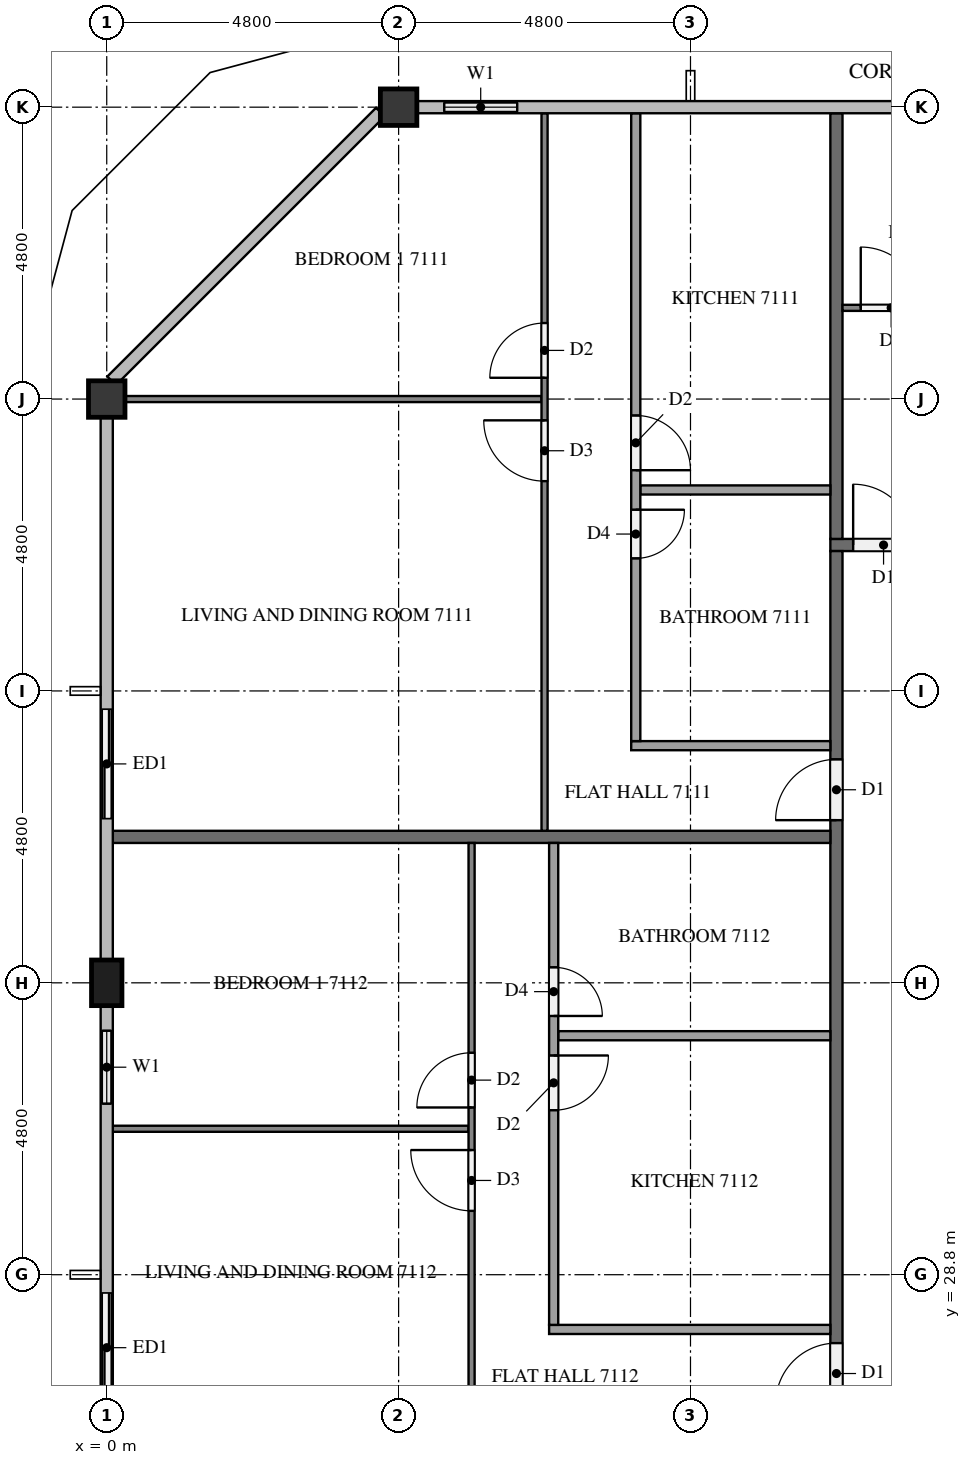
"""IFC4 building model, lengths in metres.
Left out: names, types, materials, properties, quantities, classifications, styles, units other than length and angle.
Written with IfcOpenShell. Run it as: python <this file> out.ifc"""

import sys

from ifc_helpers import new_model, si_unit, direction, frame, frame_2d, origin, origin_2d, place, context, subcontext, project, spatial, rectangle, extrude, element, fill, save


model = new_model("IFC4")
c1 = context("Model", 3, precision=1e-05, world=origin(), true_north=direction((0.0, 1.0)))
c2 = subcontext(c1, "Body", "Model", "MODEL_VIEW")
j1 = project(units=[si_unit("LENGTHUNIT", "METRE"), si_unit("PLANEANGLEUNIT", "RADIAN")], contexts=[c1])
p1 = place(None, origin())
s1 = spatial("IfcSite", under=j1, at=p1, CompositionType="ELEMENT")
p2 = place(p1, origin())
s2 = spatial("IfcBuilding", under=s1, at=p2, CompositionType="ELEMENT")
p3 = place(p2, frame((0.0, 0.0, 272.1)))
s3 = spatial("IfcBuildingStorey", under=s2, at=p3, CompositionType="ELEMENT", Elevation=272.1)
for number, where, z_axis, x_axis in (
    (1, (4.8, 48.0, 0.0), (0.0, 0.0, 1.0), (1.0, 0.0, 0.0)),
    (2, (0.0, 43.2, 0.0), (0.0, 0.0, 1.0), (1.0, 0.0, 0.0)),
):
    element("IfcColumn", number, at=place(p3, frame(where, z_axis=z_axis, x_axis=x_axis)), inside=s3, PredefinedType="COLUMN", context=c2, shape_type="SweptSolid", body=[
        extrude(rectangle(XDim=0.6, YDim=0.6, at=origin_2d()), origin(), (0.0, 0.0, 1.0), 3.2),
    ])
p4 = place(p3, frame((0.0, 33.6, 0.0), z_axis=(0.0, 0.0, 1.0), x_axis=(0.0, 1.0, 0.0)))
e3 = element("IfcColumn", 3, at=p4, inside=s3, PredefinedType="COLUMN", context=c2, shape_type="SweptSolid", body=[
    extrude(rectangle(XDim=0.75, YDim=0.5, at=origin_2d()), origin(), (0.0, 0.0, 1.0), 3.2),
])
p5 = place(p3, frame((7.2, 48.0, 0.0), z_axis=(0.0, 0.0, 1.0), x_axis=(-1.0, 0.0, 0.0)))
e4 = element("IfcWall", 4, at=p5, inside=s3, PredefinedType="SOLIDWALL", context=c2, shape_type="SweptSolid", body=[
    extrude(rectangle(XDim=2.1, YDim=0.15, at=frame_2d((1.05, 0.0))), origin(), (0.0, 0.0, 1.0), 3.2),
])
p6 = place(p5, frame((0.45, 0.0, 0.9)))
e5 = element("IfcOpeningElement", 5, at=p6, cuts=e4, PredefinedType="OPENING", context=c2, shape_type="SweptSolid", body=[
    extrude(rectangle(XDim=1.2, YDim=1.4, at=frame_2d((0.6, 0.7))), frame((0.0, 0.085, 0.0), z_axis=(0.0, -1.0, 0.0), x_axis=(1.0, 0.0, 0.0)), (0.0, 0.0, 1.0), 0.17),
])
p7 = place(p3, frame((0.0, 38.4, 0.0), z_axis=(0.0, 0.0, 1.0), x_axis=(0.0, -1.0, 0.0)))
e6 = element("IfcWall", 6, at=p7, inside=s3, PredefinedType="SOLIDWALL", context=c2, shape_type="SweptSolid", body=[
    extrude(rectangle(XDim=2.4, YDim=0.15, at=frame_2d((1.2, 0.0))), origin(), (0.0, 0.0, 1.0), 3.2),
])
p8 = place(p7, frame((0.3, 0.0, 0.0)))
e7 = element("IfcOpeningElement", 7, at=p8, cuts=e6, PredefinedType="OPENING", context=c2, shape_type="SweptSolid", body=[
    extrude(rectangle(XDim=1.8, YDim=2.4, at=frame_2d((0.9, 1.2))), frame((0.0, 0.085, 0.0), z_axis=(0.0, -1.0, 0.0), x_axis=(1.0, 0.0, 0.0)), (0.0, 0.0, 1.0), 0.17),
])
p9 = place(p3, frame((0.0, 33.225, 0.0), z_axis=(0.0, 0.0, 1.0), x_axis=(0.0, -1.0, 0.0)))
e8 = element("IfcWall", 8, at=p9, inside=s3, PredefinedType="SOLIDWALL", context=c2, shape_type="SweptSolid", body=[
    extrude(rectangle(XDim=2.025, YDim=0.15, at=frame_2d((1.013, 0.0))), origin(), (0.0, 0.0, 1.0), 3.2),
])
p10 = place(p9, frame((0.413, 0.0, 0.9)))
e9 = element("IfcOpeningElement", 9, at=p10, cuts=e8, PredefinedType="OPENING", context=c2, shape_type="SweptSolid", body=[
    extrude(rectangle(XDim=1.2, YDim=1.4, at=frame_2d((0.6, 0.7))), frame((0.0, 0.085, 0.0), z_axis=(0.0, -1.0, 0.0), x_axis=(1.0, 0.0, 0.0)), (0.0, 0.0, 1.0), 0.17),
])
p11 = place(p3, frame((0.0, 28.8, 0.0), z_axis=(0.0, 0.0, 1.0), x_axis=(0.0, -1.0, 0.0)))
e10 = element("IfcWall", 10, at=p11, inside=s3, PredefinedType="SOLIDWALL", context=c2, shape_type="SweptSolid", body=[
    extrude(rectangle(XDim=2.4, YDim=0.15, at=frame_2d((1.2, 0.0))), origin(), (0.0, 0.0, 1.0), 3.2),
])
p12 = place(p11, frame((0.3, 0.0, 0.0)))
e11 = element("IfcOpeningElement", 11, at=p12, cuts=e10, PredefinedType="OPENING", context=c2, shape_type="SweptSolid", body=[
    extrude(rectangle(XDim=1.8, YDim=2.4, at=frame_2d((0.9, 1.2))), frame((0.0, 0.085, 0.0), z_axis=(0.0, -1.0, 0.0), x_axis=(1.0, 0.0, 0.0)), (0.0, 0.0, 1.0), 0.17),
])
p13 = place(p3, frame((11.9, 40.8, 0.0), z_axis=(0.0, 0.0, 1.0), x_axis=(1.0, 0.0, 0.0)))
e12 = element("IfcWall", 12, at=p13, inside=s3, PredefinedType="PARTITIONING", context=c2, shape_type="SweptSolid", body=[
    extrude(rectangle(XDim=38.6, YDim=0.2, at=frame_2d((19.3, 0.0))), origin(), (0.0, 0.0, 1.0), 3.2),
])
p14 = place(p13, frame((31.575, 0.0, 0.0)))
e13 = element("IfcOpeningElement", 13, at=p14, cuts=e12, PredefinedType="OPENING", context=c2, shape_type="SweptSolid", body=[
    extrude(rectangle(XDim=1.0, YDim=2.1, at=frame_2d((0.5, 1.05))), frame((0.0, 0.11, 0.0), z_axis=(0.0, -1.0, 0.0), x_axis=(1.0, 0.0, 0.0)), (0.0, 0.0, 1.0), 0.22),
])
p15 = place(p13, frame((24.375, 0.0, 0.0)))
e14 = element("IfcOpeningElement", 14, at=p15, cuts=e12, PredefinedType="OPENING", context=c2, shape_type="SweptSolid", body=[
    extrude(rectangle(XDim=1.0, YDim=2.1, at=frame_2d((0.5, 1.05))), frame((0.0, 0.11, 0.0), z_axis=(0.0, -1.0, 0.0), x_axis=(1.0, 0.0, 0.0)), (0.0, 0.0, 1.0), 0.22),
])
p16 = place(p13, frame((22.825, 0.0, 0.0)))
e15 = element("IfcOpeningElement", 15, at=p16, cuts=e12, PredefinedType="OPENING", context=c2, shape_type="SweptSolid", body=[
    extrude(rectangle(XDim=1.0, YDim=2.1, at=frame_2d((0.5, 1.05))), frame((0.0, 0.11, 0.0), z_axis=(0.0, -1.0, 0.0), x_axis=(1.0, 0.0, 0.0)), (0.0, 0.0, 1.0), 0.22),
])
p17 = place(p13, frame((0.375, 0.0, 0.0)))
e16 = element("IfcOpeningElement", 16, at=p17, cuts=e12, PredefinedType="OPENING", context=c2, shape_type="SweptSolid", body=[
    extrude(rectangle(XDim=1.0, YDim=2.1, at=frame_2d((0.5, 1.05))), frame((0.0, 0.11, 0.0), z_axis=(0.0, -1.0, 0.0), x_axis=(1.0, 0.0, 0.0)), (0.0, 0.0, 1.0), 0.22),
])
p18 = place(p3, frame((12.0, 12.1, 0.0), z_axis=(0.0, 0.0, 1.0), x_axis=(0.0, 1.0, 0.0)))
e17 = element("IfcWall", 17, at=p18, inside=s3, PredefinedType="PARTITIONING", context=c2, shape_type="SweptSolid", body=[
    extrude(rectangle(XDim=28.6, YDim=0.2, at=frame_2d((14.3, 0.0))), origin(), (0.0, 0.0, 1.0), 3.2),
])
p19 = place(p18, frame((24.175, 0.0, 0.0)))
e18 = element("IfcOpeningElement", 18, at=p19, cuts=e17, PredefinedType="OPENING", context=c2, shape_type="SweptSolid", body=[
    extrude(rectangle(XDim=1.0, YDim=2.1, at=frame_2d((0.5, 1.05))), frame((0.0, 0.11, 0.0), z_axis=(0.0, -1.0, 0.0), x_axis=(1.0, 0.0, 0.0)), (0.0, 0.0, 1.0), 0.22),
])
p20 = place(p18, frame((14.575, 0.0, 0.0)))
e19 = element("IfcOpeningElement", 19, at=p20, cuts=e17, PredefinedType="OPENING", context=c2, shape_type="SweptSolid", body=[
    extrude(rectangle(XDim=1.0, YDim=2.1, at=frame_2d((0.5, 1.05))), frame((0.0, 0.11, 0.0), z_axis=(0.0, -1.0, 0.0), x_axis=(1.0, 0.0, 0.0)), (0.0, 0.0, 1.0), 0.22),
])
p21 = place(p18, frame((0.175, 0.0, 0.0)))
e20 = element("IfcOpeningElement", 20, at=p21, cuts=e17, PredefinedType="OPENING", context=c2, shape_type="SweptSolid", body=[
    extrude(rectangle(XDim=1.0, YDim=2.1, at=frame_2d((0.5, 1.05))), frame((0.0, 0.11, 0.0), z_axis=(0.0, -1.0, 0.0), x_axis=(1.0, 0.0, 0.0)), (0.0, 0.0, 1.0), 0.22),
])
p22 = place(p3, frame((12.0, 47.9, 0.0), z_axis=(0.0, 0.0, 1.0), x_axis=(0.0, -1.0, 0.0)))
e21 = element("IfcWall", 21, at=p22, inside=s3, PredefinedType="PARTITIONING", context=c2, shape_type="SweptSolid", body=[
    extrude(rectangle(XDim=7.0, YDim=0.2, at=frame_2d((3.5, 0.0))), origin(), (0.0, 0.0, 1.0), 3.2),
])
p23 = place(p3, frame((0.1, 36.0, 0.0), z_axis=(0.0, 0.0, 1.0), x_axis=(1.0, 0.0, 0.0)))
e22 = element("IfcWall", 22, at=p23, inside=s3, PredefinedType="PARTITIONING", context=c2, shape_type="SweptSolid", body=[
    extrude(rectangle(XDim=11.8, YDim=0.2, at=frame_2d((5.9, 0.0))), origin(), (0.0, 0.0, 1.0), 3.2),
])
p24 = place(p3, frame((12.1, 44.7, 0.0), z_axis=(0.0, 0.0, 1.0), x_axis=(1.0, 0.0, 0.0)))
e23 = element("IfcWall", 23, at=p24, inside=s3, PredefinedType="PARTITIONING", context=c2, shape_type="SweptSolid", body=[
    extrude(rectangle(XDim=9.4, YDim=0.1, at=frame_2d((4.7, 0.0))), origin(), (0.0, 0.0, 1.0), 3.2),
])
p25 = place(p24, frame((0.3, 0.0, 0.0)))
e24 = element("IfcOpeningElement", 24, at=p25, cuts=e23, PredefinedType="OPENING", context=c2, shape_type="SweptSolid", body=[
    extrude(rectangle(XDim=1.0, YDim=2.1, at=frame_2d((0.5, 1.05))), frame((0.0, 0.06, 0.0), z_axis=(0.0, -1.0, 0.0), x_axis=(1.0, 0.0, 0.0)), (0.0, 0.0, 1.0), 0.12),
])
p26 = place(p24, frame((8.2, 0.0, 0.0)))
e25 = element("IfcOpeningElement", 25, at=p26, cuts=e23, PredefinedType="OPENING", context=c2, shape_type="SweptSolid", body=[
    extrude(rectangle(XDim=0.9, YDim=2.1, at=frame_2d((0.45, 1.05))), frame((0.0, 0.06, 0.0), z_axis=(0.0, -1.0, 0.0), x_axis=(1.0, 0.0, 0.0)), (0.0, 0.0, 1.0), 0.12),
])
p27 = place(p3, frame((7.15, 43.2, 0.0), z_axis=(0.0, 0.0, 1.0), x_axis=(-1.0, 0.0, 0.0)))
e26 = element("IfcWall", 26, at=p27, inside=s3, PredefinedType="PARTITIONING", context=c2, shape_type="SweptSolid", body=[
    extrude(rectangle(XDim=6.85, YDim=0.1, at=frame_2d((3.425, 0.0))), origin(), (0.0, 0.0, 1.0), 3.2),
])
p28 = place(p3, frame((7.2, 36.1, 0.0), z_axis=(0.0, 0.0, 1.0), x_axis=(0.0, 1.0, 0.0)))
e27 = element("IfcWall", 27, at=p28, inside=s3, PredefinedType="PARTITIONING", context=c2, shape_type="SweptSolid", body=[
    extrude(rectangle(XDim=11.8, YDim=0.1, at=frame_2d((5.9, 0.0))), origin(), (0.0, 0.0, 1.0), 3.2),
])
p29 = place(p28, frame((5.75, 0.0, 0.0)))
e28 = element("IfcOpeningElement", 28, at=p29, cuts=e27, PredefinedType="OPENING", context=c2, shape_type="SweptSolid", body=[
    extrude(rectangle(XDim=1.0, YDim=2.1, at=frame_2d((0.5, 1.05))), frame((0.0, 0.06, 0.0), z_axis=(0.0, -1.0, 0.0), x_axis=(1.0, 0.0, 0.0)), (0.0, 0.0, 1.0), 0.12),
])
p30 = place(p28, frame((7.45, 0.0, 0.0)))
e29 = element("IfcOpeningElement", 29, at=p30, cuts=e27, PredefinedType="OPENING", context=c2, shape_type="SweptSolid", body=[
    extrude(rectangle(XDim=0.9, YDim=2.1, at=frame_2d((0.45, 1.05))), frame((0.0, 0.06, 0.0), z_axis=(0.0, -1.0, 0.0), x_axis=(1.0, 0.0, 0.0)), (0.0, 0.0, 1.0), 0.12),
])
p31 = place(p3, frame((11.9, 41.705, 0.0), z_axis=(0.0, 0.0, 1.0), x_axis=(-1.0, 0.0, 0.0)))
e30 = element("IfcWall", 30, at=p31, inside=s3, PredefinedType="PARTITIONING", context=c2, shape_type="SweptSolid", body=[
    extrude(rectangle(XDim=3.125, YDim=0.15, at=frame_2d((1.562, 0.0))), origin(), (0.0, 0.0, 1.0), 3.2),
])
p32 = place(p3, frame((11.9, 37.5, 0.0), z_axis=(0.0, 0.0, 1.0), x_axis=(-1.0, 0.0, 0.0)))
e31 = element("IfcWall", 31, at=p32, inside=s3, PredefinedType="PARTITIONING", context=c2, shape_type="SweptSolid", body=[
    extrude(rectangle(XDim=3.275, YDim=0.15, at=frame_2d((1.637, 0.0))), origin(), (0.0, 0.0, 1.0), 3.2),
])
p33 = place(p3, frame((8.7, 47.9, 0.0), z_axis=(0.0, 0.0, 1.0), x_axis=(0.0, -1.0, 0.0)))
e32 = element("IfcWall", 32, at=p33, inside=s3, PredefinedType="PARTITIONING", context=c2, shape_type="SweptSolid", body=[
    extrude(rectangle(XDim=10.325, YDim=0.15, at=frame_2d((5.163, 0.0))), origin(), (0.0, 0.0, 1.0), 3.2),
])
p34 = place(p33, frame((6.52, 0.0, 0.0)))
e33 = element("IfcOpeningElement", 33, at=p34, cuts=e32, PredefinedType="OPENING", context=c2, shape_type="SweptSolid", body=[
    extrude(rectangle(XDim=0.8, YDim=2.1, at=frame_2d((0.4, 1.05))), frame((0.0, 0.085, 0.0), z_axis=(0.0, -1.0, 0.0), x_axis=(1.0, 0.0, 0.0)), (0.0, 0.0, 1.0), 0.17),
])
p35 = place(p33, frame((4.97, 0.0, 0.0)))
e34 = element("IfcOpeningElement", 34, at=p35, cuts=e32, PredefinedType="OPENING", context=c2, shape_type="SweptSolid", body=[
    extrude(rectangle(XDim=0.9, YDim=2.1, at=frame_2d((0.45, 1.05))), frame((0.0, 0.085, 0.0), z_axis=(0.0, -1.0, 0.0), x_axis=(1.0, 0.0, 0.0)), (0.0, 0.0, 1.0), 0.17),
])
p36 = place(p3, frame((5.95, 31.2, 0.0), z_axis=(0.0, 0.0, 1.0), x_axis=(-1.0, 0.0, 0.0)))
e35 = element("IfcWall", 35, at=p36, inside=s3, PredefinedType="PARTITIONING", context=c2, shape_type="SweptSolid", body=[
    extrude(rectangle(XDim=5.85, YDim=0.1, at=frame_2d((2.925, 0.0))), origin(), (0.0, 0.0, 1.0), 3.2),
])
p37 = place(p3, frame((6.0, 26.5, 0.0), z_axis=(0.0, 0.0, 1.0), x_axis=(0.0, 1.0, 0.0)))
e36 = element("IfcWall", 36, at=p37, inside=s3, PredefinedType="PARTITIONING", context=c2, shape_type="SweptSolid", body=[
    extrude(rectangle(XDim=9.4, YDim=0.1, at=frame_2d((4.7, 0.0))), origin(), (0.0, 0.0, 1.0), 3.2),
])
p38 = place(p37, frame((3.35, 0.0, 0.0)))
e37 = element("IfcOpeningElement", 37, at=p38, cuts=e36, PredefinedType="OPENING", context=c2, shape_type="SweptSolid", body=[
    extrude(rectangle(XDim=1.0, YDim=2.1, at=frame_2d((0.5, 1.05))), frame((0.0, 0.06, 0.0), z_axis=(0.0, -1.0, 0.0), x_axis=(1.0, 0.0, 0.0)), (0.0, 0.0, 1.0), 0.12),
])
p39 = place(p37, frame((5.05, 0.0, 0.0)))
e38 = element("IfcOpeningElement", 38, at=p39, cuts=e36, PredefinedType="OPENING", context=c2, shape_type="SweptSolid", body=[
    extrude(rectangle(XDim=0.9, YDim=2.1, at=frame_2d((0.45, 1.05))), frame((0.0, 0.06, 0.0), z_axis=(0.0, -1.0, 0.0), x_axis=(1.0, 0.0, 0.0)), (0.0, 0.0, 1.0), 0.12),
])
p40 = place(p3, frame((11.9, 32.73, 0.0), z_axis=(0.0, 0.0, 1.0), x_axis=(-1.0, 0.0, 0.0)))
e39 = element("IfcWall", 39, at=p40, inside=s3, PredefinedType="PARTITIONING", context=c2, shape_type="SweptSolid", body=[
    extrude(rectangle(XDim=4.475, YDim=0.15, at=frame_2d((2.237, 0.0))), origin(), (0.0, 0.0, 1.0), 3.2),
])
p41 = place(p3, frame((11.9, 27.9, 0.0), z_axis=(0.0, 0.0, 1.0), x_axis=(-1.0, 0.0, 0.0)))
e40 = element("IfcWall", 40, at=p41, inside=s3, PredefinedType="PARTITIONING", context=c2, shape_type="SweptSolid", body=[
    extrude(rectangle(XDim=4.625, YDim=0.15, at=frame_2d((2.312, 0.0))), origin(), (0.0, 0.0, 1.0), 3.2),
])
p42 = place(p3, frame((7.35, 35.9, 0.0), z_axis=(0.0, 0.0, 1.0), x_axis=(0.0, -1.0, 0.0)))
e41 = element("IfcWall", 41, at=p42, inside=s3, PredefinedType="PARTITIONING", context=c2, shape_type="SweptSolid", body=[
    extrude(rectangle(XDim=7.925, YDim=0.15, at=frame_2d((3.962, 0.0))), origin(), (0.0, 0.0, 1.0), 3.2),
])
p43 = place(p42, frame((3.495, 0.0, 0.0)))
e42 = element("IfcOpeningElement", 42, at=p43, cuts=e41, PredefinedType="OPENING", context=c2, shape_type="SweptSolid", body=[
    extrude(rectangle(XDim=0.9, YDim=2.1, at=frame_2d((0.45, 1.05))), frame((0.0, 0.085, 0.0), z_axis=(0.0, -1.0, 0.0), x_axis=(1.0, 0.0, 0.0)), (0.0, 0.0, 1.0), 0.17),
])
p44 = place(p42, frame((2.045, 0.0, 0.0)))
e43 = element("IfcOpeningElement", 43, at=p44, cuts=e41, PredefinedType="OPENING", context=c2, shape_type="SweptSolid", body=[
    extrude(rectangle(XDim=0.8, YDim=2.1, at=frame_2d((0.4, 1.05))), frame((0.0, 0.085, 0.0), z_axis=(0.0, -1.0, 0.0), x_axis=(1.0, 0.0, 0.0)), (0.0, 0.0, 1.0), 0.17),
])
p45 = place(p6, origin())
e44 = element("IfcWindow", 44, at=p45, inside=s3, PartitioningType="SINGLE_PANEL", PredefinedType="WINDOW", context=c2, shape_type="SweptSolid", body=[
    extrude(rectangle(XDim=1.2, YDim=1.4, at=frame_2d((0.6, 0.7))), frame((0.0, 0.03, 0.0), z_axis=(0.0, -1.0, 0.0), x_axis=(1.0, 0.0, 0.0)), (0.0, 0.0, 1.0), 0.06),
])
fill(e5, e44)
p46 = place(p8, origin())
e45 = element("IfcDoor", 45, at=p46, inside=s3, OperationType="SLIDING_TO_LEFT", PredefinedType="DOOR", context=c2, shape_type="SweptSolid", body=[
    extrude(rectangle(XDim=1.8, YDim=2.4, at=frame_2d((0.9, 1.2))), frame((0.0, 0.025, 0.0), z_axis=(0.0, -1.0, 0.0), x_axis=(1.0, 0.0, 0.0)), (0.0, 0.0, 1.0), 0.05),
])
fill(e7, e45)
p47 = place(p10, origin())
e46 = element("IfcWindow", 46, at=p47, inside=s3, PartitioningType="SINGLE_PANEL", PredefinedType="WINDOW", context=c2, shape_type="SweptSolid", body=[
    extrude(rectangle(XDim=1.2, YDim=1.4, at=frame_2d((0.6, 0.7))), frame((0.0, 0.03, 0.0), z_axis=(0.0, -1.0, 0.0), x_axis=(1.0, 0.0, 0.0)), (0.0, 0.0, 1.0), 0.06),
])
fill(e9, e46)
p48 = place(p12, origin())
e47 = element("IfcDoor", 47, at=p48, inside=s3, OperationType="SLIDING_TO_RIGHT", PredefinedType="DOOR", context=c2, shape_type="SweptSolid", body=[
    extrude(rectangle(XDim=1.8, YDim=2.4, at=frame_2d((0.9, 1.2))), frame((0.0, 0.025, 0.0), z_axis=(0.0, -1.0, 0.0), x_axis=(1.0, 0.0, 0.0)), (0.0, 0.0, 1.0), 0.05),
])
fill(e11, e47)
p49 = place(p17, origin())
e48 = element("IfcDoor", 48, at=p49, inside=s3, OperationType="SINGLE_SWING_LEFT", PredefinedType="DOOR", context=c2, shape_type="SweptSolid", body=[
    extrude(rectangle(XDim=1.0, YDim=2.1, at=frame_2d((0.5, 1.05))), frame((0.0, 0.025, 0.0), z_axis=(0.0, -1.0, 0.0), x_axis=(1.0, 0.0, 0.0)), (0.0, 0.0, 1.0), 0.05),
])
fill(e16, e48)
p50 = place(p19, origin())
e49 = element("IfcDoor", 49, at=p50, inside=s3, OperationType="SINGLE_SWING_LEFT", PredefinedType="DOOR", context=c2, shape_type="SweptSolid", body=[
    extrude(rectangle(XDim=1.0, YDim=2.1, at=frame_2d((0.5, 1.05))), frame((0.0, 0.025, 0.0), z_axis=(0.0, -1.0, 0.0), x_axis=(1.0, 0.0, 0.0)), (0.0, 0.0, 1.0), 0.05),
])
fill(e18, e49)
p51 = place(p20, origin())
e50 = element("IfcDoor", 50, at=p51, inside=s3, OperationType="SINGLE_SWING_LEFT", PredefinedType="DOOR", context=c2, shape_type="SweptSolid", body=[
    extrude(rectangle(XDim=1.0, YDim=2.1, at=frame_2d((0.5, 1.05))), frame((0.0, 0.025, 0.0), z_axis=(0.0, -1.0, 0.0), x_axis=(1.0, 0.0, 0.0)), (0.0, 0.0, 1.0), 0.05),
])
fill(e19, e50)
p52 = place(p25, origin())
e51 = element("IfcDoor", 51, at=p52, inside=s3, OperationType="SINGLE_SWING_LEFT", PredefinedType="DOOR", context=c2, shape_type="SweptSolid", body=[
    extrude(rectangle(XDim=1.0, YDim=2.1, at=frame_2d((0.5, 1.05))), frame((0.0, 0.025, 0.0), z_axis=(0.0, -1.0, 0.0), x_axis=(1.0, 0.0, 0.0)), (0.0, 0.0, 1.0), 0.05),
])
fill(e24, e51)
p53 = place(p29, origin())
e52 = element("IfcDoor", 52, at=p53, inside=s3, OperationType="SINGLE_SWING_RIGHT", PredefinedType="DOOR", context=c2, shape_type="SweptSolid", body=[
    extrude(rectangle(XDim=1.0, YDim=2.1, at=frame_2d((0.5, 1.05))), frame((0.0, 0.025, 0.0), z_axis=(0.0, -1.0, 0.0), x_axis=(1.0, 0.0, 0.0)), (0.0, 0.0, 1.0), 0.05),
])
fill(e28, e52)
p54 = place(p30, origin())
e53 = element("IfcDoor", 53, at=p54, inside=s3, OperationType="SINGLE_SWING_LEFT", PredefinedType="DOOR", context=c2, shape_type="SweptSolid", body=[
    extrude(rectangle(XDim=0.9, YDim=2.1, at=frame_2d((0.45, 1.05))), frame((0.0, 0.025, 0.0), z_axis=(0.0, -1.0, 0.0), x_axis=(1.0, 0.0, 0.0)), (0.0, 0.0, 1.0), 0.05),
])
fill(e29, e53)
p55 = place(p34, origin())
e54 = element("IfcDoor", 54, at=p55, inside=s3, OperationType="SINGLE_SWING_LEFT", PredefinedType="DOOR", context=c2, shape_type="SweptSolid", body=[
    extrude(rectangle(XDim=0.8, YDim=2.1, at=frame_2d((0.4, 1.05))), frame((0.0, 0.025, 0.0), z_axis=(0.0, -1.0, 0.0), x_axis=(1.0, 0.0, 0.0)), (0.0, 0.0, 1.0), 0.05),
])
fill(e33, e54)
p56 = place(p35, origin())
e55 = element("IfcDoor", 55, at=p56, inside=s3, OperationType="SINGLE_SWING_RIGHT", PredefinedType="DOOR", context=c2, shape_type="SweptSolid", body=[
    extrude(rectangle(XDim=0.9, YDim=2.1, at=frame_2d((0.45, 1.05))), frame((0.0, 0.025, 0.0), z_axis=(0.0, -1.0, 0.0), x_axis=(1.0, 0.0, 0.0)), (0.0, 0.0, 1.0), 0.05),
])
fill(e34, e55)
p57 = place(p38, origin())
e56 = element("IfcDoor", 56, at=p57, inside=s3, OperationType="SINGLE_SWING_RIGHT", PredefinedType="DOOR", context=c2, shape_type="SweptSolid", body=[
    extrude(rectangle(XDim=1.0, YDim=2.1, at=frame_2d((0.5, 1.05))), frame((0.0, 0.025, 0.0), z_axis=(0.0, -1.0, 0.0), x_axis=(1.0, 0.0, 0.0)), (0.0, 0.0, 1.0), 0.05),
])
fill(e37, e56)
p58 = place(p39, origin())
e57 = element("IfcDoor", 57, at=p58, inside=s3, OperationType="SINGLE_SWING_LEFT", PredefinedType="DOOR", context=c2, shape_type="SweptSolid", body=[
    extrude(rectangle(XDim=0.9, YDim=2.1, at=frame_2d((0.45, 1.05))), frame((0.0, 0.025, 0.0), z_axis=(0.0, -1.0, 0.0), x_axis=(1.0, 0.0, 0.0)), (0.0, 0.0, 1.0), 0.05),
])
fill(e38, e57)
p59 = place(p43, origin())
e58 = element("IfcDoor", 58, at=p59, inside=s3, OperationType="SINGLE_SWING_LEFT", PredefinedType="DOOR", context=c2, shape_type="SweptSolid", body=[
    extrude(rectangle(XDim=0.9, YDim=2.1, at=frame_2d((0.45, 1.05))), frame((0.0, 0.025, 0.0), z_axis=(0.0, -1.0, 0.0), x_axis=(1.0, 0.0, 0.0)), (0.0, 0.0, 1.0), 0.05),
])
fill(e42, e58)
p60 = place(p44, origin())
e59 = element("IfcDoor", 59, at=p60, inside=s3, OperationType="SINGLE_SWING_RIGHT", PredefinedType="DOOR", context=c2, shape_type="SweptSolid", body=[
    extrude(rectangle(XDim=0.8, YDim=2.1, at=frame_2d((0.4, 1.05))), frame((0.0, 0.025, 0.0), z_axis=(0.0, -1.0, 0.0), x_axis=(1.0, 0.0, 0.0)), (0.0, 0.0, 1.0), 0.05),
])
fill(e43, e59)
save(model, sys.argv[1])
